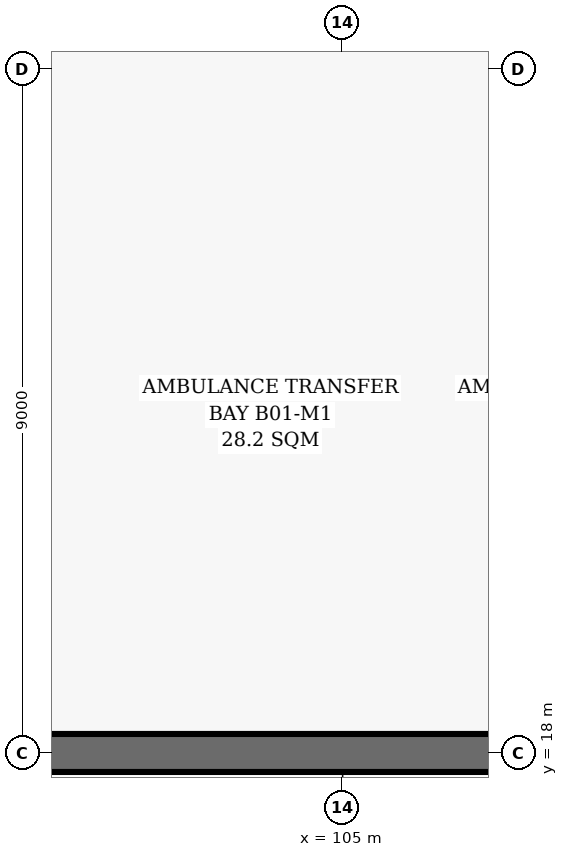
"""IFC4 building model, lengths in metres.
Left out: names, types, materials, properties, quantities, classifications, styles, units other than length and angle.
Written with IfcOpenShell. Run it as: python <this file> out.ifc"""

import sys

from ifc_helpers import new_model, si_unit, direction, frame, frame_2d, origin, place, context, subcontext, project, spatial, rectangle, extrude, element, save


model = new_model("IFC4")
c1 = context("Model", 3, precision=1e-05, world=origin(), true_north=direction((0.0, 1.0)))
c2 = subcontext(c1, "Body", "Model", "MODEL_VIEW")
j1 = project(units=[si_unit("LENGTHUNIT", "METRE"), si_unit("PLANEANGLEUNIT", "RADIAN")], contexts=[c1])
p1 = place(None, origin())
s1 = spatial("IfcSite", under=j1, at=p1, CompositionType="ELEMENT")
p2 = place(p1, origin())
s2 = spatial("IfcBuilding", under=s1, at=p2, CompositionType="ELEMENT")
p3 = place(p2, frame((0.0, 0.0, -4.8)))
s3 = spatial("IfcBuildingStorey", under=s2, at=p3, CompositionType="ELEMENT", Elevation=-4.8)
p4 = place(p3, frame((162.0, 18.0, 0.0), z_axis=(0.0, 0.0, 1.0), x_axis=(-1.0, 0.0, 0.0)))
e1 = element("IfcWall", 1, at=p4, inside=s3, PredefinedType="SOLIDWALL", context=c2, shape_type="SweptSolid", body=[
    extrude(rectangle(XDim=63.0, YDim=0.5, at=frame_2d((31.5, 0.0))), origin(), (0.0, 0.0, 1.0), 4.5),
])
save(model, sys.argv[1])
